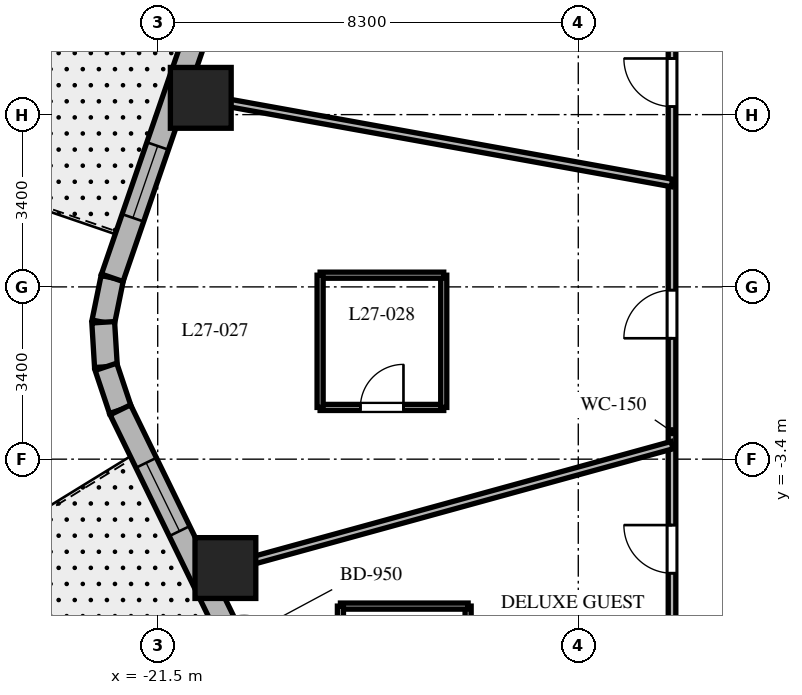
"""IFC4 building model, lengths in metres.
Left out: names, types, materials, properties, quantities, classifications, styles, units other than length and angle.
Written with IfcOpenShell. Run it as: python <this file> out.ifc"""

import sys

from ifc_helpers import new_model, si_unit, direction, frame, frame_2d, origin, origin_2d, place, context, subcontext, project, spatial, rectangle, extrude, element, fill, save


model = new_model("IFC4")
c1 = context("Model", 3, precision=1e-05, world=origin(), true_north=direction((0.0, 1.0)))
c2 = subcontext(c1, "Body", "Model", "MODEL_VIEW")
j1 = project(units=[si_unit("LENGTHUNIT", "METRE"), si_unit("PLANEANGLEUNIT", "RADIAN")], contexts=[c1])
p1 = place(None, origin())
s1 = spatial("IfcSite", under=j1, at=p1, CompositionType="ELEMENT")
p2 = place(p1, origin())
s2 = spatial("IfcBuilding", under=s1, at=p2, CompositionType="ELEMENT")
p3 = place(p2, frame((0.0, 0.0, 113.6)))
s3 = spatial("IfcBuildingStorey", under=s2, at=p3, CompositionType="ELEMENT", Elevation=113.6)
for number, where, z_axis, x_axis in (
    (1, (-20.65, 3.731, 0.0), (0.0, 0.0, 1.0), (1.0, 0.0, 0.0)),
    (2, (-20.164, -5.549, 0.0), (0.0, 0.0, 1.0), (1.0, 0.0, 0.0)),
):
    element("IfcColumn", number, at=place(p3, frame(where, z_axis=z_axis, x_axis=x_axis)), inside=s3, PredefinedType="COLUMN", context=c2, shape_type="SweptSolid", body=[
        extrude(rectangle(XDim=1.2, YDim=1.2, at=origin_2d()), origin(), (0.0, 0.0, 1.0), 3.7),
    ])
p4 = place(p3, frame((-22.397, 0.179, 0.0), z_axis=(0.0, 0.0, 1.0), x_axis=(-0.199313589404, -0.979935759669, 0.0)))
e3 = element("IfcWall", 3, at=p4, inside=s3, PredefinedType="SOLIDWALL", context=c2, shape_type="SweptSolid", body=[
    extrude(rectangle(XDim=0.896, YDim=0.45, at=frame_2d((0.448, 0.0))), origin(), (0.0, 0.0, 1.0), 3.4),
])
p5 = place(p3, frame((-22.575, -0.698, 0.0), z_axis=(0.0, 0.0, 1.0), x_axis=(0.060980441946, -0.998138961117, 0.0)))
e4 = element("IfcWall", 4, at=p5, inside=s3, PredefinedType="SOLIDWALL", context=c2, shape_type="SweptSolid", body=[
    extrude(rectangle(XDim=0.881, YDim=0.45, at=frame_2d((0.44, 0.0))), origin(), (0.0, 0.0, 1.0), 3.4),
])
p6 = place(p3, frame((-22.522, -1.577, 0.0), z_axis=(0.0, 0.0, 1.0), x_axis=(0.317372694837, -0.948300887151, 0.0)))
e5 = element("IfcWall", 5, at=p6, inside=s3, PredefinedType="SOLIDWALL", context=c2, shape_type="SweptSolid", body=[
    extrude(rectangle(XDim=0.896, YDim=0.45, at=frame_2d((0.448, 0.0))), origin(), (0.0, 0.0, 1.0), 3.4),
])
p7 = place(p3, frame((-15.992, 18.777, 0.0), z_axis=(0.0, 0.0, 1.0), x_axis=(-0.325606988926, -0.945505202927, 0.0)))
e6 = element("IfcWall", 6, at=p7, inside=s3, PredefinedType="SOLIDWALL", context=c2, shape_type="SweptSolid", body=[
    extrude(rectangle(XDim=19.669, YDim=0.45, at=frame_2d((9.835, 0.0))), origin(), (0.0, 0.0, 1.0), 3.4),
])
p8 = place(p7, frame((4.909, 0.0, 0.0)))
e7 = element("IfcOpeningElement", 7, at=p8, cuts=e6, PredefinedType="OPENING", context=c2, shape_type="SweptSolid", body=[
    extrude(rectangle(XDim=1.0, YDim=2.15, at=frame_2d((0.5, 1.075))), frame((0.0, 0.235, 0.0), z_axis=(0.0, -1.0, 0.0), x_axis=(1.0, 0.0, 0.0)), (0.0, 0.0, 1.0), 0.47),
])
p9 = place(p7, frame((1.197, 0.0, 0.8)))
e8 = element("IfcOpeningElement", 8, at=p9, cuts=e6, PredefinedType="OPENING", context=c2, shape_type="SweptSolid", body=[
    extrude(rectangle(XDim=1.5, YDim=1.8, at=frame_2d((0.75, 0.9))), frame((0.0, 0.235, 0.0), z_axis=(0.0, -1.0, 0.0), x_axis=(1.0, 0.0, 0.0)), (0.0, 0.0, 1.0), 0.47),
])
p10 = place(p7, frame((6.714, 0.0, 0.8)))
e9 = element("IfcOpeningElement", 9, at=p10, cuts=e6, PredefinedType="OPENING", context=c2, shape_type="SweptSolid", body=[
    extrude(rectangle(XDim=1.5, YDim=1.8, at=frame_2d((0.75, 0.9))), frame((0.0, 0.235, 0.0), z_axis=(0.0, -1.0, 0.0), x_axis=(1.0, 0.0, 0.0)), (0.0, 0.0, 1.0), 0.47),
])
p11 = place(p7, frame((11.53, 0.0, 0.8)))
e10 = element("IfcOpeningElement", 10, at=p11, cuts=e6, PredefinedType="OPENING", context=c2, shape_type="SweptSolid", body=[
    extrude(rectangle(XDim=1.5, YDim=1.8, at=frame_2d((0.75, 0.9))), frame((0.0, 0.235, 0.0), z_axis=(0.0, -1.0, 0.0), x_axis=(1.0, 0.0, 0.0)), (0.0, 0.0, 1.0), 0.47),
])
p12 = place(p7, frame((16.918, 0.0, 0.8)))
e11 = element("IfcOpeningElement", 11, at=p12, cuts=e6, PredefinedType="OPENING", context=c2, shape_type="SweptSolid", body=[
    extrude(rectangle(XDim=1.5, YDim=1.8, at=frame_2d((0.75, 0.9))), frame((0.0, 0.235, 0.0), z_axis=(0.0, -1.0, 0.0), x_axis=(1.0, 0.0, 0.0)), (0.0, 0.0, 1.0), 0.47),
])
p13 = place(p3, frame((-22.238, -2.427, 0.0), z_axis=(0.0, 0.0, 1.0), x_axis=(0.438374803278, -0.898792262901, 0.0)))
e12 = element("IfcWall", 12, at=p13, inside=s3, PredefinedType="SOLIDWALL", context=c2, shape_type="SweptSolid", body=[
    extrude(rectangle(XDim=18.618, YDim=0.45, at=frame_2d((9.309, 0.0))), origin(), (0.0, 0.0, 1.0), 3.4),
])
p14 = place(p13, frame((4.62, 0.0, 0.0)))
e13 = element("IfcOpeningElement", 13, at=p14, cuts=e12, PredefinedType="OPENING", context=c2, shape_type="SweptSolid", body=[
    extrude(rectangle(XDim=0.95, YDim=2.15, at=frame_2d((0.475, 1.075))), frame((0.0, 0.235, 0.0), z_axis=(0.0, -1.0, 0.0), x_axis=(1.0, 0.0, 0.0)), (0.0, 0.0, 1.0), 0.47),
])
p15 = place(p13, frame((1.163, 0.0, 0.8)))
e14 = element("IfcOpeningElement", 14, at=p15, cuts=e12, PredefinedType="OPENING", context=c2, shape_type="SweptSolid", body=[
    extrude(rectangle(XDim=1.5, YDim=1.8, at=frame_2d((0.75, 0.9))), frame((0.0, 0.235, 0.0), z_axis=(0.0, -1.0, 0.0), x_axis=(1.0, 0.0, 0.0)), (0.0, 0.0, 1.0), 0.47),
])
p16 = place(p13, frame((6.262, 0.0, 0.8)))
e15 = element("IfcOpeningElement", 15, at=p16, cuts=e12, PredefinedType="OPENING", context=c2, shape_type="SweptSolid", body=[
    extrude(rectangle(XDim=1.5, YDim=1.8, at=frame_2d((0.75, 0.9))), frame((0.0, 0.235, 0.0), z_axis=(0.0, -1.0, 0.0), x_axis=(1.0, 0.0, 0.0)), (0.0, 0.0, 1.0), 0.47),
])
p17 = place(p13, frame((11.501, 0.0, 0.8)))
e16 = element("IfcOpeningElement", 16, at=p17, cuts=e12, PredefinedType="OPENING", context=c2, shape_type="SweptSolid", body=[
    extrude(rectangle(XDim=1.5, YDim=1.8, at=frame_2d((0.75, 0.9))), frame((0.0, 0.235, 0.0), z_axis=(0.0, -1.0, 0.0), x_axis=(1.0, 0.0, 0.0)), (0.0, 0.0, 1.0), 0.47),
])
p18 = place(p13, frame((16.006, 0.0, 0.8)))
e17 = element("IfcOpeningElement", 17, at=p18, cuts=e12, PredefinedType="OPENING", context=c2, shape_type="SweptSolid", body=[
    extrude(rectangle(XDim=1.5, YDim=1.8, at=frame_2d((0.75, 0.9))), frame((0.0, 0.235, 0.0), z_axis=(0.0, -1.0, 0.0), x_axis=(1.0, 0.0, 0.0)), (0.0, 0.0, 1.0), 0.47),
])
p19 = place(p3, frame((-11.35, -9.85, 0.0), z_axis=(0.0, 0.0, 1.0), x_axis=(0.0, 1.0, 0.0)))
e18 = element("IfcWall", 18, at=p19, inside=s3, PredefinedType="PARTITIONING", context=c2, shape_type="SweptSolid", body=[
    extrude(rectangle(XDim=19.7, YDim=0.15, at=frame_2d((9.85, 0.0))), origin(), (0.0, 0.0, 1.0), 2.84),
])
p20 = place(p19, frame((17.197, 0.0, 0.0)))
e19 = element("IfcOpeningElement", 19, at=p20, cuts=e18, PredefinedType="OPENING", context=c2, shape_type="SweptSolid", body=[
    extrude(rectangle(XDim=0.9, YDim=2.03, at=frame_2d((0.45, 1.015))), frame((0.0, 0.085, 0.0), z_axis=(0.0, -1.0, 0.0), x_axis=(1.0, 0.0, 0.0)), (0.0, 0.0, 1.0), 0.17),
])
p21 = place(p19, frame((13.408, 0.0, 0.0)))
e20 = element("IfcOpeningElement", 20, at=p21, cuts=e18, PredefinedType="OPENING", context=c2, shape_type="SweptSolid", body=[
    extrude(rectangle(XDim=0.95, YDim=2.03, at=frame_2d((0.475, 1.015))), frame((0.0, 0.085, 0.0), z_axis=(0.0, -1.0, 0.0), x_axis=(1.0, 0.0, 0.0)), (0.0, 0.0, 1.0), 0.17),
])
p22 = place(p19, frame((8.836, 0.0, 0.0)))
e21 = element("IfcOpeningElement", 21, at=p22, cuts=e18, PredefinedType="OPENING", context=c2, shape_type="SweptSolid", body=[
    extrude(rectangle(XDim=0.95, YDim=2.03, at=frame_2d((0.475, 1.015))), frame((0.0, 0.085, 0.0), z_axis=(0.0, -1.0, 0.0), x_axis=(1.0, 0.0, 0.0)), (0.0, 0.0, 1.0), 0.17),
])
p23 = place(p19, frame((4.199, 0.0, 0.0)))
e22 = element("IfcOpeningElement", 22, at=p23, cuts=e18, PredefinedType="OPENING", context=c2, shape_type="SweptSolid", body=[
    extrude(rectangle(XDim=0.95, YDim=2.03, at=frame_2d((0.475, 1.015))), frame((0.0, 0.085, 0.0), z_axis=(0.0, -1.0, 0.0), x_axis=(1.0, 0.0, 0.0)), (0.0, 0.0, 1.0), 0.17),
])
p24 = place(p19, frame((1.002, 0.0, 0.0)))
e23 = element("IfcOpeningElement", 23, at=p24, cuts=e18, PredefinedType="OPENING", context=c2, shape_type="SweptSolid", body=[
    extrude(rectangle(XDim=0.9, YDim=2.03, at=frame_2d((0.45, 1.015))), frame((0.0, 0.085, 0.0), z_axis=(0.0, -1.0, 0.0), x_axis=(1.0, 0.0, 0.0)), (0.0, 0.0, 1.0), 0.17),
])
p25 = place(p3, frame((-11.35, 2.051, 0.0), z_axis=(0.0, 0.0, 1.0), x_axis=(-0.984068313063, 0.177790762484, 0.0)))
e24 = element("IfcWall", 24, at=p25, inside=s3, PredefinedType="PARTITIONING", context=c2, shape_type="SweptSolid", body=[
    extrude(rectangle(XDim=9.951, YDim=0.15, at=frame_2d((4.976, 0.0))), origin(), (0.0, 0.0, 1.0), 2.54),
])
p26 = place(p3, frame((-11.35, -3.123, 0.0), z_axis=(0.0, 0.0, 1.0), x_axis=(-0.964151983214, -0.265350623261, 0.0)))
e25 = element("IfcWall", 25, at=p26, inside=s3, PredefinedType="PARTITIONING", context=c2, shape_type="SweptSolid", body=[
    extrude(rectangle(XDim=9.645, YDim=0.15, at=frame_2d((4.823, 0.0))), origin(), (0.0, 0.0, 1.0), 2.54),
])
p27 = place(p3, frame((-18.295, -2.379, 0.0), z_axis=(0.0, 0.0, 1.0), x_axis=(1.0, 0.0, 0.0)))
e26 = element("IfcWall", 26, at=p27, inside=s3, PredefinedType="PARTITIONING", context=c2, shape_type="SweptSolid", body=[
    extrude(rectangle(XDim=2.44, YDim=0.12, at=frame_2d((1.22, 0.0))), origin(), (0.0, 0.0, 1.0), 2.84),
])
p28 = place(p27, frame((0.795, 0.0, 0.0)))
e27 = element("IfcOpeningElement", 27, at=p28, cuts=e26, PredefinedType="OPENING", context=c2, shape_type="SweptSolid", body=[
    extrude(rectangle(XDim=0.85, YDim=2.03, at=frame_2d((0.425, 1.015))), frame((0.0, 0.07, 0.0), z_axis=(0.0, -1.0, 0.0), x_axis=(1.0, 0.0, 0.0)), (0.0, 0.0, 1.0), 0.14),
])
p29 = place(p3, frame((-15.855, -2.379, 0.0), z_axis=(0.0, 0.0, 1.0), x_axis=(0.0, 1.0, 0.0)))
e28 = element("IfcWall", 28, at=p29, inside=s3, PredefinedType="PARTITIONING", context=c2, shape_type="SweptSolid", body=[
    extrude(rectangle(XDim=2.61, YDim=0.12, at=frame_2d((1.305, 0.0))), origin(), (0.0, 0.0, 1.0), 3.4),
])
p30 = place(p3, frame((-15.855, 0.231, 0.0), z_axis=(0.0, 0.0, 1.0), x_axis=(-1.0, 0.0, 0.0)))
e29 = element("IfcWall", 29, at=p30, inside=s3, PredefinedType="PARTITIONING", context=c2, shape_type="SweptSolid", body=[
    extrude(rectangle(XDim=2.44, YDim=0.12, at=frame_2d((1.22, 0.0))), origin(), (0.0, 0.0, 1.0), 2.84),
])
p31 = place(p3, frame((-18.295, 0.231, 0.0), z_axis=(0.0, 0.0, 1.0), x_axis=(0.0, -1.0, 0.0)))
e30 = element("IfcWall", 30, at=p31, inside=s3, PredefinedType="PARTITIONING", context=c2, shape_type="SweptSolid", body=[
    extrude(rectangle(XDim=2.61, YDim=0.12, at=frame_2d((1.305, 0.0))), origin(), (0.0, 0.0, 1.0), 3.4),
])
p32 = place(p3, frame((-15.374, -8.98, 0.0), z_axis=(0.0, 0.0, 1.0), x_axis=(0.0, 1.0, 0.0)))
e31 = element("IfcWall", 31, at=p32, inside=s3, PredefinedType="PARTITIONING", context=c2, shape_type="SweptSolid", body=[
    extrude(rectangle(XDim=2.68, YDim=0.12, at=frame_2d((1.34, 0.0))), origin(), (0.0, 0.0, 1.0), 2.84),
])
p33 = place(p3, frame((-15.374, -6.3, 0.0), z_axis=(0.0, 0.0, 1.0), x_axis=(-1.0, 0.0, 0.0)))
e32 = element("IfcWall", 32, at=p33, inside=s3, PredefinedType="PARTITIONING", context=c2, shape_type="SweptSolid", body=[
    extrude(rectangle(XDim=2.52, YDim=0.12, at=frame_2d((1.26, 0.0))), origin(), (0.0, 0.0, 1.0), 2.84),
])
p34 = place(p3, frame((-17.894, -6.3, 0.0), z_axis=(0.0, 0.0, 1.0), x_axis=(0.0, -1.0, 0.0)))
e33 = element("IfcWall", 33, at=p34, inside=s3, PredefinedType="PARTITIONING", context=c2, shape_type="SweptSolid", body=[
    extrude(rectangle(XDim=2.68, YDim=0.12, at=frame_2d((1.34, 0.0))), origin(), (0.0, 0.0, 1.0), 3.4),
])
p35 = place(p12, origin())
e34 = element("IfcWindow", 34, at=p35, inside=s3, PartitioningType="SINGLE_PANEL", PredefinedType="WINDOW", context=c2, shape_type="SweptSolid", body=[
    extrude(rectangle(XDim=1.5, YDim=1.8, at=frame_2d((0.75, 0.9))), frame((0.0, 0.03, 0.0), z_axis=(0.0, -1.0, 0.0), x_axis=(1.0, 0.0, 0.0)), (0.0, 0.0, 1.0), 0.06),
])
fill(e11, e34)
p36 = place(p15, origin())
e35 = element("IfcWindow", 35, at=p36, inside=s3, PartitioningType="SINGLE_PANEL", PredefinedType="WINDOW", context=c2, shape_type="SweptSolid", body=[
    extrude(rectangle(XDim=1.5, YDim=1.8, at=frame_2d((0.75, 0.9))), frame((0.0, 0.03, 0.0), z_axis=(0.0, -1.0, 0.0), x_axis=(1.0, 0.0, 0.0)), (0.0, 0.0, 1.0), 0.06),
])
fill(e14, e35)
p37 = place(p21, origin())
e36 = element("IfcDoor", 36, at=p37, inside=s3, OperationType="SINGLE_SWING_RIGHT", PredefinedType="DOOR", context=c2, shape_type="SweptSolid", body=[
    extrude(rectangle(XDim=0.95, YDim=2.03, at=frame_2d((0.475, 1.015))), frame((0.0, 0.025, 0.0), z_axis=(0.0, -1.0, 0.0), x_axis=(1.0, 0.0, 0.0)), (0.0, 0.0, 1.0), 0.05),
])
fill(e20, e36)
p38 = place(p22, origin())
e37 = element("IfcDoor", 37, at=p38, inside=s3, OperationType="SINGLE_SWING_LEFT", PredefinedType="DOOR", context=c2, shape_type="SweptSolid", body=[
    extrude(rectangle(XDim=0.95, YDim=2.03, at=frame_2d((0.475, 1.015))), frame((0.0, 0.025, 0.0), z_axis=(0.0, -1.0, 0.0), x_axis=(1.0, 0.0, 0.0)), (0.0, 0.0, 1.0), 0.05),
])
fill(e21, e37)
p39 = place(p28, origin())
e38 = element("IfcDoor", 38, at=p39, inside=s3, OperationType="SINGLE_SWING_RIGHT", PredefinedType="DOOR", context=c2, shape_type="SweptSolid", body=[
    extrude(rectangle(XDim=0.85, YDim=2.03, at=frame_2d((0.425, 1.015))), frame((0.0, 0.025, 0.0), z_axis=(0.0, -1.0, 0.0), x_axis=(1.0, 0.0, 0.0)), (0.0, 0.0, 1.0), 0.05),
])
fill(e27, e38)
p40 = place(p23, origin())
e39 = element("IfcDoor", 39, at=p40, inside=s3, OperationType="SINGLE_SWING_RIGHT", PredefinedType="DOOR", context=c2, shape_type="SweptSolid", body=[
    extrude(rectangle(XDim=0.95, YDim=2.03, at=frame_2d((0.475, 1.015))), frame((0.0, 0.025, 0.0), z_axis=(0.0, -1.0, 0.0), x_axis=(1.0, 0.0, 0.0)), (0.0, 0.0, 1.0), 0.05),
])
fill(e22, e39)
save(model, sys.argv[1])
